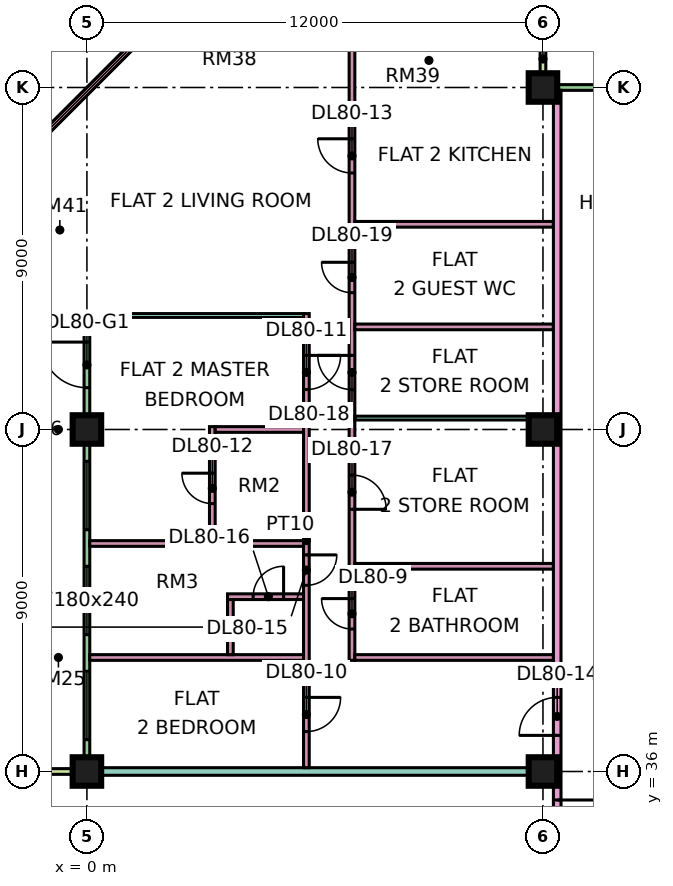
"""IFC4 building model, lengths in metres.
Left out: names, types, materials, properties, quantities, classifications, styles, units other than length and angle.
Written with IfcOpenShell. Run it as: python <this file> out.ifc"""

import sys

from ifc_helpers import new_model, si_unit, direction, frame, frame_2d, origin, origin_2d, place, context, subcontext, project, spatial, rectangle, extrude, element, fill, save


model = new_model("IFC4")
c1 = context("Model", 3, precision=1e-05, world=origin(), true_north=direction((0.0, 1.0)))
c2 = subcontext(c1, "Body", "Model", "MODEL_VIEW")
j1 = project(units=[si_unit("LENGTHUNIT", "METRE"), si_unit("PLANEANGLEUNIT", "RADIAN")], contexts=[c1])
p1 = place(None, origin())
s1 = spatial("IfcSite", under=j1, at=p1, CompositionType="ELEMENT")
p2 = place(p1, origin())
s2 = spatial("IfcBuilding", under=s1, at=p2, CompositionType="ELEMENT")
p3 = place(p2, frame((0.0, 0.0, 346.4)))
s3 = spatial("IfcBuildingStorey", under=s2, at=p3, CompositionType="ELEMENT", Elevation=346.4)
p4 = place(p3, frame((0.0, 36.0, 0.0), z_axis=(0.0, 0.0, 1.0), x_axis=(1.0, 0.0, 0.0)))
e1 = element("IfcColumn", 1, at=p4, inside=s3, PredefinedType="COLUMN", context=c2, shape_type="SweptSolid", body=[
    extrude(rectangle(XDim=0.75, YDim=0.75, at=origin_2d()), origin(), (0.0, 0.0, 1.0), 3.75),
])
for number, where, z_axis, x_axis in (
    (2, (0.0, 45.0, 0.0), (0.0, 0.0, 1.0), (1.0, 0.0, 0.0)),
    (3, (12.0, 36.0, 0.0), (0.0, 0.0, 1.0), (1.0, 0.0, 0.0)),
    (4, (12.0, 45.0, 0.0), (0.0, 0.0, 1.0), (1.0, 0.0, 0.0)),
    (5, (12.0, 54.0, 0.0), (0.0, 0.0, 1.0), (1.0, 0.0, 0.0)),
):
    element("IfcColumn", number, at=place(p3, frame(where, z_axis=z_axis, x_axis=x_axis)), inside=s3, PredefinedType="COLUMN", context=c2, shape_type="SweptSolid", body=[
        extrude(rectangle(XDim=0.75, YDim=0.75, at=origin_2d()), origin(), (0.0, 0.0, 1.0), 3.75),
    ])
p5 = place(p3, frame((22.425, 54.0, 0.0), z_axis=(0.0, 0.0, 1.0), x_axis=(-1.0, 0.0, 0.0)))
e6 = element("IfcWall", 6, at=p5, inside=s3, PredefinedType="SOLIDWALL", context=c2, shape_type="SweptSolid", body=[
    extrude(rectangle(XDim=10.35, YDim=0.15, at=frame_2d((5.175, 0.0))), origin(), (0.0, 0.0, 1.0), 3.35),
])
p6 = place(p5, frame((1.012, 0.0, 0.45)))
e7 = element("IfcOpeningElement", 7, at=p6, cuts=e6, PredefinedType="OPENING", context=c2, shape_type="SweptSolid", body=[
    extrude(rectangle(XDim=4.8, YDim=2.4, at=frame_2d((2.4, 1.2))), frame((0.0, 0.085, 0.0), z_axis=(0.0, -1.0, 0.0), x_axis=(1.0, 0.0, 0.0)), (0.0, 0.0, 1.0), 0.17),
])
p7 = place(p3, frame((12.0, 55.5, 0.0), z_axis=(0.0, 0.0, 1.0), x_axis=(0.0, -1.0, 0.0)))
e8 = element("IfcWall", 8, at=p7, inside=s3, PredefinedType="SOLIDWALL", context=c2, shape_type="SweptSolid", body=[
    extrude(rectangle(XDim=1.5, YDim=0.15, at=frame_2d((0.75, 0.0))), origin(), (0.0, 0.0, 1.0), 3.35),
])
p8 = place(p3, frame((1.553, 55.447, 0.0), z_axis=(0.0, 0.0, 1.0), x_axis=(-0.707106781187, -0.707106781187, 0.0)))
e9 = element("IfcWall", 9, at=p8, inside=s3, PredefinedType="SOLIDWALL", context=c2, shape_type="SweptSolid", body=[
    extrude(rectangle(XDim=4.243, YDim=0.15, at=frame_2d((2.121, 0.0))), origin(), (0.0, 0.0, 1.0), 3.35),
])
p9 = place(p8, frame((0.621, 0.0, 0.45)))
e10 = element("IfcOpeningElement", 10, at=p9, cuts=e9, PredefinedType="OPENING", context=c2, shape_type="SweptSolid", body=[
    extrude(rectangle(XDim=3.0, YDim=2.4, at=frame_2d((1.5, 1.2))), frame((0.0, 0.085, 0.0), z_axis=(0.0, -1.0, 0.0), x_axis=(1.0, 0.0, 0.0)), (0.0, 0.0, 1.0), 0.17),
])
p10 = place(p3, frame((0.0, 47.925, 0.0), z_axis=(0.0, 0.0, 1.0), x_axis=(0.0, -1.0, 0.0)))
e11 = element("IfcWall", 11, at=p10, inside=s3, PredefinedType="SOLIDWALL", context=c2, shape_type="SweptSolid", body=[
    extrude(rectangle(XDim=11.85, YDim=0.15, at=frame_2d((5.925, 0.0))), origin(), (0.0, 0.0, 1.0), 3.35),
])
p11 = place(p10, frame((0.625, 0.0, 0.0)))
e12 = element("IfcOpeningElement", 12, at=p11, cuts=e11, PredefinedType="OPENING", context=c2, shape_type="SweptSolid", body=[
    extrude(rectangle(XDim=1.2, YDim=2.4, at=frame_2d((0.6, 1.2))), frame((0.0, 0.085, 0.0), z_axis=(0.0, -1.0, 0.0), x_axis=(1.0, 0.0, 0.0)), (0.0, 0.0, 1.0), 0.17),
])
p12 = place(p10, frame((3.762, 0.0, 0.45)))
e13 = element("IfcOpeningElement", 13, at=p12, cuts=e11, PredefinedType="OPENING", context=c2, shape_type="SweptSolid", body=[
    extrude(rectangle(XDim=1.8, YDim=2.4, at=frame_2d((0.9, 1.2))), frame((0.0, 0.085, 0.0), z_axis=(0.0, -1.0, 0.0), x_axis=(1.0, 0.0, 0.0)), (0.0, 0.0, 1.0), 0.17),
])
p13 = place(p10, frame((6.525, 0.0, 0.45)))
e14 = element("IfcOpeningElement", 14, at=p13, cuts=e11, PredefinedType="OPENING", context=c2, shape_type="SweptSolid", body=[
    extrude(rectangle(XDim=1.8, YDim=2.4, at=frame_2d((0.9, 1.2))), frame((0.0, 0.085, 0.0), z_axis=(0.0, -1.0, 0.0), x_axis=(1.0, 0.0, 0.0)), (0.0, 0.0, 1.0), 0.17),
])
p14 = place(p10, frame((9.288, 0.0, 0.45)))
e15 = element("IfcOpeningElement", 15, at=p14, cuts=e11, PredefinedType="OPENING", context=c2, shape_type="SweptSolid", body=[
    extrude(rectangle(XDim=1.8, YDim=2.4, at=frame_2d((0.9, 1.2))), frame((0.0, 0.085, 0.0), z_axis=(0.0, -1.0, 0.0), x_axis=(1.0, 0.0, 0.0)), (0.0, 0.0, 1.0), 0.17),
])
for number, where, z_axis, x_axis in (
    (16, (-1.5, 48.0, 0.0), (0.0, 0.0, 1.0), (1.0, 0.0, 0.0)),
    (17, (-1.5, 36.0, 0.0), (0.0, 0.0, 1.0), (1.0, 0.0, 0.0)),
):
    element("IfcWall", number, at=place(p3, frame(where, z_axis=z_axis, x_axis=x_axis)), inside=s3, PredefinedType="SOLIDWALL", context=c2, shape_type="SweptSolid", body=[
        extrude(rectangle(XDim=1.5, YDim=0.15, at=frame_2d((0.75, 0.0))), origin(), (0.0, 0.0, 1.0), 3.35),
    ])
e18 = element("IfcWall", 18, at=p4, inside=s3, PredefinedType="PARTITIONING", context=c2, shape_type="SweptSolid", body=[
    extrude(rectangle(XDim=12.275, YDim=0.2, at=frame_2d((6.137, 0.0))), origin(), (0.0, 0.0, 1.0), 3.35),
])
p15 = place(p3, frame((0.0, 48.0, 0.0), z_axis=(0.0, 0.0, 1.0), x_axis=(1.0, 0.0, 0.0)))
e19 = element("IfcWall", 19, at=p15, inside=s3, PredefinedType="PARTITIONING", context=c2, shape_type="SweptSolid", body=[
    extrude(rectangle(XDim=5.7, YDim=0.1, at=frame_2d((2.85, 0.0))), origin(), (0.0, 0.0, 1.0), 3.35),
])
for number, where, z_axis, x_axis in (
    (20, (0.074, 39.0, 0.0), (0.0, 0.0, 1.0), (1.0, 0.0, 0.0)),
    (21, (0.074, 42.0, 0.0), (0.0, 0.0, 1.0), (1.0, 0.0, 0.0)),
):
    element("IfcWall", number, at=place(p3, frame(where, z_axis=z_axis, x_axis=x_axis)), inside=s3, PredefinedType="PARTITIONING", context=c2, shape_type="SweptSolid", body=[
        extrude(rectangle(XDim=5.626, YDim=0.15, at=frame_2d((2.813, 0.0))), origin(), (0.0, 0.0, 1.0), 3.35),
    ])
p16 = place(p3, frame((3.3, 42.075, 0.0), z_axis=(0.0, 0.0, 1.0), x_axis=(0.0, 1.0, 0.0)))
e22 = element("IfcWall", 22, at=p16, inside=s3, PredefinedType="PARTITIONING", context=c2, shape_type="SweptSolid", body=[
    extrude(rectangle(XDim=3.0, YDim=0.15, at=frame_2d((1.5, 0.0))), origin(), (0.0, 0.0, 1.0), 3.35),
])
p17 = place(p16, frame((0.975, 0.0, 0.0)))
e23 = element("IfcOpeningElement", 23, at=p17, cuts=e22, PredefinedType="OPENING", context=c2, shape_type="SweptSolid", body=[
    extrude(rectangle(XDim=0.8, YDim=2.1, at=frame_2d((0.4, 1.05))), frame((0.0, 0.085, 0.0), z_axis=(0.0, -1.0, 0.0), x_axis=(1.0, 0.0, 0.0)), (0.0, 0.0, 1.0), 0.17),
])
p18 = place(p3, frame((3.375, 45.0, 0.0), z_axis=(0.0, 0.0, 1.0), x_axis=(1.0, 0.0, 0.0)))
e24 = element("IfcWall", 24, at=p18, inside=s3, PredefinedType="PARTITIONING", context=c2, shape_type="SweptSolid", body=[
    extrude(rectangle(XDim=2.325, YDim=0.15, at=frame_2d((1.163, 0.0))), origin(), (0.0, 0.0, 1.0), 3.35),
])
p19 = place(p3, frame((3.7, 40.6, 0.0), z_axis=(0.0, 0.0, 1.0), x_axis=(1.0, 0.0, 0.0)))
e25 = element("IfcWall", 25, at=p19, inside=s3, PredefinedType="PARTITIONING", context=c2, shape_type="SweptSolid", body=[
    extrude(rectangle(XDim=2.0, YDim=0.15, at=frame_2d((1.0, 0.0))), origin(), (0.0, 0.0, 1.0), 3.35),
])
p20 = place(p19, frame((0.675, 0.0, 0.0)))
e26 = element("IfcOpeningElement", 26, at=p20, cuts=e25, PredefinedType="OPENING", context=c2, shape_type="SweptSolid", body=[
    extrude(rectangle(XDim=0.8, YDim=2.1, at=frame_2d((0.4, 1.05))), frame((0.0, 0.085, 0.0), z_axis=(0.0, -1.0, 0.0), x_axis=(1.0, 0.0, 0.0)), (0.0, 0.0, 1.0), 0.17),
])
p21 = place(p3, frame((3.775, 39.075, 0.0), z_axis=(0.0, 0.0, 1.0), x_axis=(0.0, 1.0, 0.0)))
e27 = element("IfcWall", 27, at=p21, inside=s3, PredefinedType="PARTITIONING", context=c2, shape_type="SweptSolid", body=[
    extrude(rectangle(XDim=1.45, YDim=0.15, at=frame_2d((0.725, 0.0))), origin(), (0.0, 0.0, 1.0), 3.35),
])
p22 = place(p3, frame((5.775, 36.1, 0.0), z_axis=(0.0, 0.0, 1.0), x_axis=(0.0, 1.0, 0.0)))
e28 = element("IfcWall", 28, at=p22, inside=s3, PredefinedType="PARTITIONING", context=c2, shape_type="SweptSolid", body=[
    extrude(rectangle(XDim=11.95, YDim=0.15, at=frame_2d((5.975, 0.0))), origin(), (0.0, 0.0, 1.0), 3.35),
])
p23 = place(p22, frame((0.95, 0.0, 0.0)))
e29 = element("IfcOpeningElement", 29, at=p23, cuts=e28, PredefinedType="OPENING", context=c2, shape_type="SweptSolid", body=[
    extrude(rectangle(XDim=0.9, YDim=2.1, at=frame_2d((0.45, 1.05))), frame((0.0, 0.085, 0.0), z_axis=(0.0, -1.0, 0.0), x_axis=(1.0, 0.0, 0.0)), (0.0, 0.0, 1.0), 0.17),
])
p24 = place(p22, frame((9.95, 0.0, 0.0)))
e30 = element("IfcOpeningElement", 30, at=p24, cuts=e28, PredefinedType="OPENING", context=c2, shape_type="SweptSolid", body=[
    extrude(rectangle(XDim=0.9, YDim=2.1, at=frame_2d((0.45, 1.05))), frame((0.0, 0.085, 0.0), z_axis=(0.0, -1.0, 0.0), x_axis=(1.0, 0.0, 0.0)), (0.0, 0.0, 1.0), 0.17),
])
p25 = place(p22, frame((4.8, 0.0, 0.0)))
e31 = element("IfcOpeningElement", 31, at=p25, cuts=e28, PredefinedType="OPENING", context=c2, shape_type="SweptSolid", body=[
    extrude(rectangle(XDim=0.8, YDim=2.1, at=frame_2d((0.4, 1.05))), frame((0.0, 0.085, 0.0), z_axis=(0.0, -1.0, 0.0), x_axis=(1.0, 0.0, 0.0)), (0.0, 0.0, 1.0), 0.17),
])
p26 = place(p3, frame((6.975, 38.925, 0.0), z_axis=(0.0, 0.0, 1.0), x_axis=(0.0, 1.0, 0.0)))
e32 = element("IfcWall", 32, at=p26, inside=s3, PredefinedType="PARTITIONING", context=c2, shape_type="SweptSolid", body=[
    extrude(rectangle(XDim=16.425, YDim=0.15, at=frame_2d((8.212, 0.0))), origin(), (0.0, 0.0, 1.0), 3.35),
])
p27 = place(p26, frame((0.825, 0.0, 0.0)))
e33 = element("IfcOpeningElement", 33, at=p27, cuts=e32, PredefinedType="OPENING", context=c2, shape_type="SweptSolid", body=[
    extrude(rectangle(XDim=0.8, YDim=2.1, at=frame_2d((0.4, 1.05))), frame((0.0, 0.085, 0.0), z_axis=(0.0, -1.0, 0.0), x_axis=(1.0, 0.0, 0.0)), (0.0, 0.0, 1.0), 0.17),
])
p28 = place(p26, frame((12.825, 0.0, 0.0)))
e34 = element("IfcOpeningElement", 34, at=p28, cuts=e32, PredefinedType="OPENING", context=c2, shape_type="SweptSolid", body=[
    extrude(rectangle(XDim=0.9, YDim=2.1, at=frame_2d((0.45, 1.05))), frame((0.0, 0.085, 0.0), z_axis=(0.0, -1.0, 0.0), x_axis=(1.0, 0.0, 0.0)), (0.0, 0.0, 1.0), 0.17),
])
p29 = place(p26, frame((3.975, 0.0, 0.0)))
e35 = element("IfcOpeningElement", 35, at=p29, cuts=e32, PredefinedType="OPENING", context=c2, shape_type="SweptSolid", body=[
    extrude(rectangle(XDim=0.9, YDim=2.1, at=frame_2d((0.45, 1.05))), frame((0.0, 0.085, 0.0), z_axis=(0.0, -1.0, 0.0), x_axis=(1.0, 0.0, 0.0)), (0.0, 0.0, 1.0), 0.17),
])
p30 = place(p26, frame((7.125, 0.0, 0.0)))
e36 = element("IfcOpeningElement", 36, at=p30, cuts=e32, PredefinedType="OPENING", context=c2, shape_type="SweptSolid", body=[
    extrude(rectangle(XDim=0.9, YDim=2.1, at=frame_2d((0.45, 1.05))), frame((0.0, 0.085, 0.0), z_axis=(0.0, -1.0, 0.0), x_axis=(1.0, 0.0, 0.0)), (0.0, 0.0, 1.0), 0.17),
])
p31 = place(p26, frame((9.675, 0.0, 0.0)))
e37 = element("IfcOpeningElement", 37, at=p31, cuts=e32, PredefinedType="OPENING", context=c2, shape_type="SweptSolid", body=[
    extrude(rectangle(XDim=0.8, YDim=2.1, at=frame_2d((0.4, 1.05))), frame((0.0, 0.085, 0.0), z_axis=(0.0, -1.0, 0.0), x_axis=(1.0, 0.0, 0.0)), (0.0, 0.0, 1.0), 0.17),
])
for number, where, z_axis, x_axis in (
    (38, (7.05, 39.0, 0.0), (0.0, 0.0, 1.0), (1.0, 0.0, 0.0)),
    (39, (7.05, 41.4, 0.0), (0.0, 0.0, 1.0), (1.0, 0.0, 0.0)),
):
    element("IfcWall", number, at=place(p3, frame(where, z_axis=z_axis, x_axis=x_axis)), inside=s3, PredefinedType="PARTITIONING", context=c2, shape_type="SweptSolid", body=[
        extrude(rectangle(XDim=5.225, YDim=0.15, at=frame_2d((2.612, 0.0))), origin(), (0.0, 0.0, 1.0), 3.35),
    ])
p32 = place(p3, frame((7.05, 45.3, 0.0), z_axis=(0.0, 0.0, 1.0), x_axis=(1.0, 0.0, 0.0)))
e40 = element("IfcWall", 40, at=p32, inside=s3, PredefinedType="PARTITIONING", context=c2, shape_type="SweptSolid", body=[
    extrude(rectangle(XDim=5.225, YDim=0.1, at=frame_2d((2.612, 0.0))), origin(), (0.0, 0.0, 1.0), 3.35),
])
for number, where, z_axis, x_axis in (
    (41, (7.05, 47.7, 0.0), (0.0, 0.0, 1.0), (1.0, 0.0, 0.0)),
    (42, (7.05, 50.4, 0.0), (0.0, 0.0, 1.0), (1.0, 0.0, 0.0)),
):
    element("IfcWall", number, at=place(p3, frame(where, z_axis=z_axis, x_axis=x_axis)), inside=s3, PredefinedType="PARTITIONING", context=c2, shape_type="SweptSolid", body=[
        extrude(rectangle(XDim=5.225, YDim=0.15, at=frame_2d((2.612, 0.0))), origin(), (0.0, 0.0, 1.0), 3.35),
    ])
p33 = place(p3, frame((12.375, 20.0, 0.0), z_axis=(0.0, 0.0, 1.0), x_axis=(0.0, 1.0, 0.0)))
e43 = element("IfcWall", 43, at=p33, inside=s3, PredefinedType="PARTITIONING", context=c2, shape_type="SweptSolid", body=[
    extrude(rectangle(XDim=33.926, YDim=0.2, at=frame_2d((16.963, 0.0))), origin(), (0.0, 0.0, 1.0), 3.35),
])
p34 = place(p33, frame((16.95, 0.0, 0.0)))
e44 = element("IfcOpeningElement", 44, at=p34, cuts=e43, PredefinedType="OPENING", context=c2, shape_type="SweptSolid", body=[
    extrude(rectangle(XDim=1.0, YDim=2.1, at=frame_2d((0.5, 1.05))), frame((0.0, 0.11, 0.0), z_axis=(0.0, -1.0, 0.0), x_axis=(1.0, 0.0, 0.0)), (0.0, 0.0, 1.0), 0.22),
])
p35 = place(p33, frame((0.6, 0.0, 0.0)))
e45 = element("IfcOpeningElement", 45, at=p35, cuts=e43, PredefinedType="OPENING", context=c2, shape_type="SweptSolid", body=[
    extrude(rectangle(XDim=1.2, YDim=2.1, at=frame_2d((0.6, 1.05))), frame((0.0, 0.11, 0.0), z_axis=(0.0, -1.0, 0.0), x_axis=(1.0, 0.0, 0.0)), (0.0, 0.0, 1.0), 0.22),
])
p36 = place(p33, frame((14.25, 0.0, 0.0)))
e46 = element("IfcOpeningElement", 46, at=p36, cuts=e43, PredefinedType="OPENING", context=c2, shape_type="SweptSolid", body=[
    extrude(rectangle(XDim=1.0, YDim=2.1, at=frame_2d((0.5, 1.05))), frame((0.0, 0.11, 0.0), z_axis=(0.0, -1.0, 0.0), x_axis=(1.0, 0.0, 0.0)), (0.0, 0.0, 1.0), 0.22),
])
p37 = place(p9, origin())
e47 = element("IfcWindow", 47, at=p37, inside=s3, PartitioningType="SINGLE_PANEL", PredefinedType="WINDOW", context=c2, shape_type="SweptSolid", body=[
    extrude(rectangle(XDim=3.0, YDim=2.4, at=frame_2d((1.5, 1.2))), frame((0.0, 0.03, 0.0), z_axis=(0.0, -1.0, 0.0), x_axis=(1.0, 0.0, 0.0)), (0.0, 0.0, 1.0), 0.06),
])
fill(e10, e47)
p38 = place(p11, frame((1.2, 0.0, 0.0), z_axis=(0.0, 0.0, 1.0), x_axis=(-1.0, 0.0, 0.0)))
e48 = element("IfcDoor", 48, at=p38, inside=s3, OperationType="DOUBLE_DOOR_SINGLE_SWING", PredefinedType="DOOR", context=c2, shape_type="SweptSolid", body=[
    extrude(rectangle(XDim=1.2, YDim=2.4, at=frame_2d((0.6, 1.2))), frame((0.0, 0.025, 0.0), z_axis=(0.0, -1.0, 0.0), x_axis=(1.0, 0.0, 0.0)), (0.0, 0.0, 1.0), 0.05),
])
fill(e12, e48)
p39 = place(p12, origin())
e49 = element("IfcWindow", 49, at=p39, inside=s3, PartitioningType="SINGLE_PANEL", PredefinedType="WINDOW", context=c2, shape_type="SweptSolid", body=[
    extrude(rectangle(XDim=1.8, YDim=2.4, at=frame_2d((0.9, 1.2))), frame((0.0, 0.03, 0.0), z_axis=(0.0, -1.0, 0.0), x_axis=(1.0, 0.0, 0.0)), (0.0, 0.0, 1.0), 0.06),
])
fill(e13, e49)
p40 = place(p13, origin())
e50 = element("IfcWindow", 50, at=p40, inside=s3, PartitioningType="SINGLE_PANEL", PredefinedType="WINDOW", context=c2, shape_type="SweptSolid", body=[
    extrude(rectangle(XDim=1.8, YDim=2.4, at=frame_2d((0.9, 1.2))), frame((0.0, 0.03, 0.0), z_axis=(0.0, -1.0, 0.0), x_axis=(1.0, 0.0, 0.0)), (0.0, 0.0, 1.0), 0.06),
])
fill(e14, e50)
p41 = place(p14, origin())
e51 = element("IfcWindow", 51, at=p41, inside=s3, PartitioningType="SINGLE_PANEL", PredefinedType="WINDOW", context=c2, shape_type="SweptSolid", body=[
    extrude(rectangle(XDim=1.8, YDim=2.4, at=frame_2d((0.9, 1.2))), frame((0.0, 0.03, 0.0), z_axis=(0.0, -1.0, 0.0), x_axis=(1.0, 0.0, 0.0)), (0.0, 0.0, 1.0), 0.06),
])
fill(e15, e51)
p42 = place(p27, frame((0.8, 0.0, 0.0), z_axis=(0.0, 0.0, 1.0), x_axis=(-1.0, 0.0, 0.0)))
e52 = element("IfcDoor", 52, at=p42, inside=s3, OperationType="SINGLE_SWING_RIGHT", PredefinedType="DOOR", context=c2, shape_type="SweptSolid", body=[
    extrude(rectangle(XDim=0.8, YDim=2.1, at=frame_2d((0.4, 1.05))), frame((0.0, 0.025, 0.0), z_axis=(0.0, -1.0, 0.0), x_axis=(1.0, 0.0, 0.0)), (0.0, 0.0, 1.0), 0.05),
])
fill(e33, e52)
p43 = place(p23, origin())
e53 = element("IfcDoor", 53, at=p43, inside=s3, OperationType="SINGLE_SWING_RIGHT", PredefinedType="DOOR", context=c2, shape_type="SweptSolid", body=[
    extrude(rectangle(XDim=0.9, YDim=2.1, at=frame_2d((0.45, 1.05))), frame((0.0, 0.025, 0.0), z_axis=(0.0, -1.0, 0.0), x_axis=(1.0, 0.0, 0.0)), (0.0, 0.0, 1.0), 0.05),
])
fill(e29, e53)
p44 = place(p24, origin())
e54 = element("IfcDoor", 54, at=p44, inside=s3, OperationType="SINGLE_SWING_RIGHT", PredefinedType="DOOR", context=c2, shape_type="SweptSolid", body=[
    extrude(rectangle(XDim=0.9, YDim=2.1, at=frame_2d((0.45, 1.05))), frame((0.0, 0.025, 0.0), z_axis=(0.0, -1.0, 0.0), x_axis=(1.0, 0.0, 0.0)), (0.0, 0.0, 1.0), 0.05),
])
fill(e30, e54)
p45 = place(p17, frame((0.8, 0.0, 0.0), z_axis=(0.0, 0.0, 1.0), x_axis=(-1.0, 0.0, 0.0)))
e55 = element("IfcDoor", 55, at=p45, inside=s3, OperationType="SINGLE_SWING_RIGHT", PredefinedType="DOOR", context=c2, shape_type="SweptSolid", body=[
    extrude(rectangle(XDim=0.8, YDim=2.1, at=frame_2d((0.4, 1.05))), frame((0.0, 0.025, 0.0), z_axis=(0.0, -1.0, 0.0), x_axis=(1.0, 0.0, 0.0)), (0.0, 0.0, 1.0), 0.05),
])
fill(e23, e55)
p46 = place(p28, frame((0.9, 0.0, 0.0), z_axis=(0.0, 0.0, 1.0), x_axis=(-1.0, 0.0, 0.0)))
e56 = element("IfcDoor", 56, at=p46, inside=s3, OperationType="SINGLE_SWING_RIGHT", PredefinedType="DOOR", context=c2, shape_type="SweptSolid", body=[
    extrude(rectangle(XDim=0.9, YDim=2.1, at=frame_2d((0.45, 1.05))), frame((0.0, 0.025, 0.0), z_axis=(0.0, -1.0, 0.0), x_axis=(1.0, 0.0, 0.0)), (0.0, 0.0, 1.0), 0.05),
])
fill(e34, e56)
p47 = place(p34, origin())
e57 = element("IfcDoor", 57, at=p47, inside=s3, OperationType="SINGLE_SWING_LEFT", PredefinedType="DOOR", context=c2, shape_type="SweptSolid", body=[
    extrude(rectangle(XDim=1.0, YDim=2.1, at=frame_2d((0.5, 1.05))), frame((0.0, 0.025, 0.0), z_axis=(0.0, -1.0, 0.0), x_axis=(1.0, 0.0, 0.0)), (0.0, 0.0, 1.0), 0.05),
])
fill(e44, e57)
p48 = place(p25, origin())
e58 = element("IfcDoor", 58, at=p48, inside=s3, OperationType="SINGLE_SWING_RIGHT", PredefinedType="DOOR", context=c2, shape_type="SweptSolid", body=[
    extrude(rectangle(XDim=0.8, YDim=2.1, at=frame_2d((0.4, 1.05))), frame((0.0, 0.025, 0.0), z_axis=(0.0, -1.0, 0.0), x_axis=(1.0, 0.0, 0.0)), (0.0, 0.0, 1.0), 0.05),
])
fill(e31, e58)
p49 = place(p20, frame((0.8, 0.0, 0.0), z_axis=(0.0, 0.0, 1.0), x_axis=(-1.0, 0.0, 0.0)))
e59 = element("IfcDoor", 59, at=p49, inside=s3, OperationType="SINGLE_SWING_RIGHT", PredefinedType="DOOR", context=c2, shape_type="SweptSolid", body=[
    extrude(rectangle(XDim=0.8, YDim=2.1, at=frame_2d((0.4, 1.05))), frame((0.0, 0.025, 0.0), z_axis=(0.0, -1.0, 0.0), x_axis=(1.0, 0.0, 0.0)), (0.0, 0.0, 1.0), 0.05),
])
fill(e26, e59)
p50 = place(p29, frame((0.9, 0.0, 0.0), z_axis=(0.0, 0.0, 1.0), x_axis=(-1.0, 0.0, 0.0)))
e60 = element("IfcDoor", 60, at=p50, inside=s3, OperationType="SINGLE_SWING_LEFT", PredefinedType="DOOR", context=c2, shape_type="SweptSolid", body=[
    extrude(rectangle(XDim=0.9, YDim=2.1, at=frame_2d((0.45, 1.05))), frame((0.0, 0.025, 0.0), z_axis=(0.0, -1.0, 0.0), x_axis=(1.0, 0.0, 0.0)), (0.0, 0.0, 1.0), 0.05),
])
fill(e35, e60)
p51 = place(p30, frame((0.9, 0.0, 0.0), z_axis=(0.0, 0.0, 1.0), x_axis=(-1.0, 0.0, 0.0)))
e61 = element("IfcDoor", 61, at=p51, inside=s3, OperationType="SINGLE_SWING_RIGHT", PredefinedType="DOOR", context=c2, shape_type="SweptSolid", body=[
    extrude(rectangle(XDim=0.9, YDim=2.1, at=frame_2d((0.45, 1.05))), frame((0.0, 0.025, 0.0), z_axis=(0.0, -1.0, 0.0), x_axis=(1.0, 0.0, 0.0)), (0.0, 0.0, 1.0), 0.05),
])
fill(e36, e61)
p52 = place(p31, frame((0.8, 0.0, 0.0), z_axis=(0.0, 0.0, 1.0), x_axis=(-1.0, 0.0, 0.0)))
e62 = element("IfcDoor", 62, at=p52, inside=s3, OperationType="SINGLE_SWING_RIGHT", PredefinedType="DOOR", context=c2, shape_type="SweptSolid", body=[
    extrude(rectangle(XDim=0.8, YDim=2.1, at=frame_2d((0.4, 1.05))), frame((0.0, 0.025, 0.0), z_axis=(0.0, -1.0, 0.0), x_axis=(1.0, 0.0, 0.0)), (0.0, 0.0, 1.0), 0.05),
])
fill(e37, e62)
p53 = place(p36, origin())
e63 = element("IfcDoor", 63, at=p53, inside=s3, OperationType="SINGLE_SWING_RIGHT", PredefinedType="DOOR", context=c2, shape_type="SweptSolid", body=[
    extrude(rectangle(XDim=1.0, YDim=2.1, at=frame_2d((0.5, 1.05))), frame((0.0, 0.025, 0.0), z_axis=(0.0, -1.0, 0.0), x_axis=(1.0, 0.0, 0.0)), (0.0, 0.0, 1.0), 0.05),
])
fill(e46, e63)
save(model, sys.argv[1])
